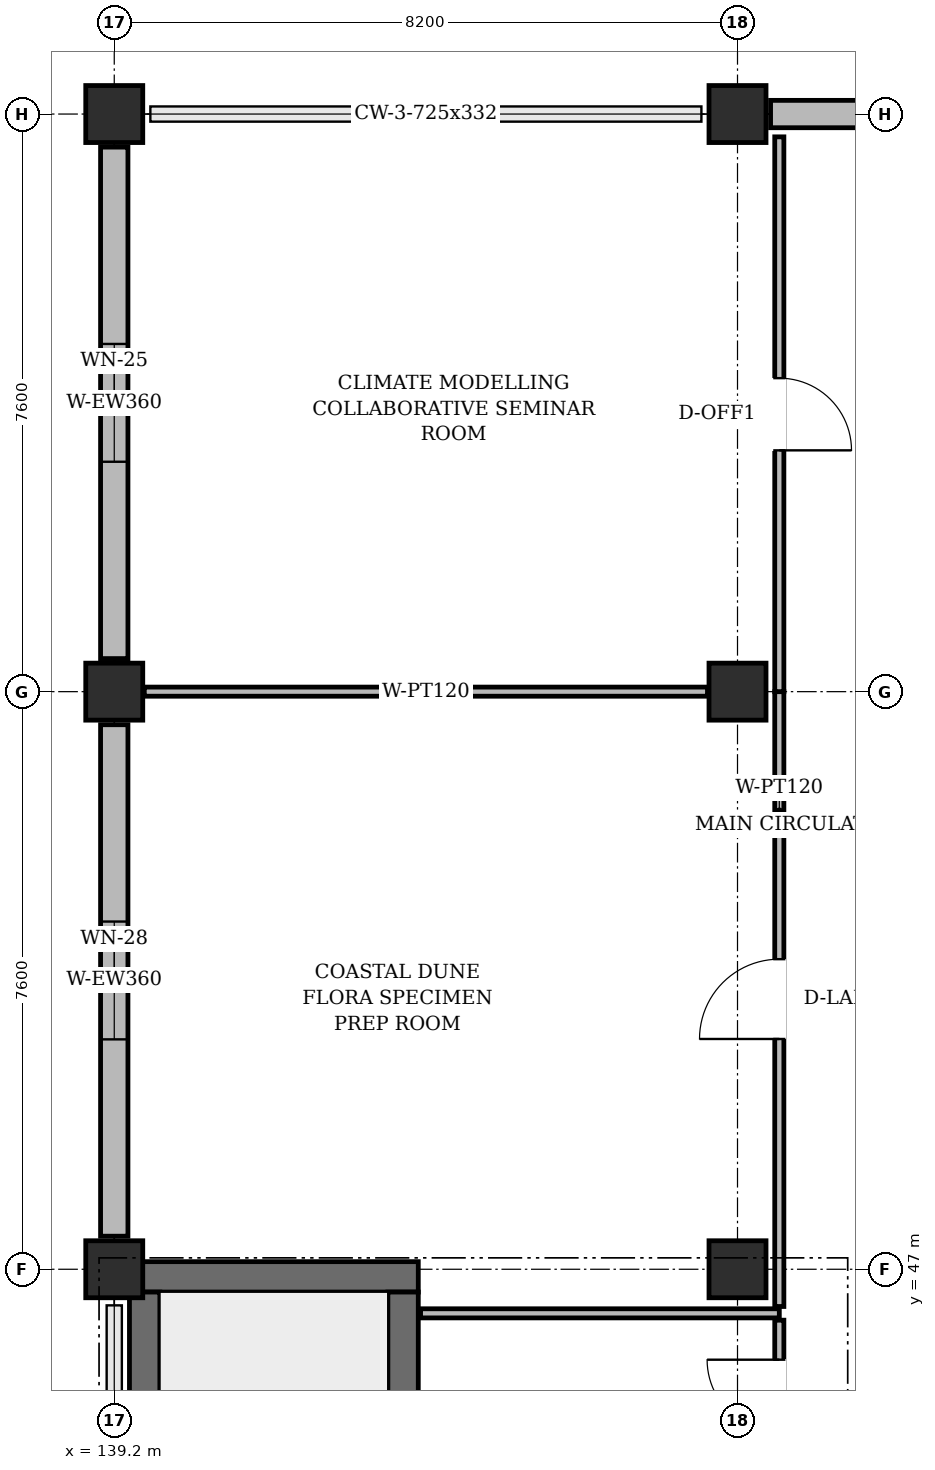
"""IFC4 building model, lengths in metres.
Left out: names, types, materials, properties, quantities, classifications, styles, units other than length and angle.
Written with IfcOpenShell. Run it as: python <this file> out.ifc"""

import sys

from ifc_helpers import new_model, si_unit, direction, frame, frame_2d, origin, origin_2d, place, context, subcontext, project, spatial, rectangle, extrude, element, fill, save


model = new_model("IFC4")
c1 = context("Model", 3, precision=1e-05, world=origin(), true_north=direction((0.0, 1.0)))
c2 = subcontext(c1, "Body", "Model", "MODEL_VIEW")
j1 = project(units=[si_unit("LENGTHUNIT", "METRE"), si_unit("PLANEANGLEUNIT", "RADIAN")], contexts=[c1])
p1 = place(None, origin())
s1 = spatial("IfcSite", under=j1, at=p1, CompositionType="ELEMENT")
p2 = place(p1, origin())
s2 = spatial("IfcBuilding", under=s1, at=p2, CompositionType="ELEMENT")
p3 = place(p2, frame((0.0, 0.0, 57.6)))
s3 = spatial("IfcBuildingStorey", under=s2, at=p3, CompositionType="ELEMENT", Elevation=57.6)
for number, where, z_axis, x_axis in (
    (1, (139.2, 47.0, 0.0), (0.0, 0.0, 1.0), (1.0, 0.0, 0.0)),
    (2, (139.2, 54.6, 0.0), (0.0, 0.0, 1.0), (1.0, 0.0, 0.0)),
    (3, (139.2, 62.2, 0.0), (0.0, 0.0, 1.0), (1.0, 0.0, 0.0)),
    (4, (147.4, 47.0, 0.0), (0.0, 0.0, 1.0), (1.0, 0.0, 0.0)),
    (5, (147.4, 54.6, 0.0), (0.0, 0.0, 1.0), (1.0, 0.0, 0.0)),
    (6, (147.4, 62.2, 0.0), (0.0, 0.0, 1.0), (1.0, 0.0, 0.0)),
):
    element("IfcColumn", number, at=place(p3, frame(where, z_axis=z_axis, x_axis=x_axis)), inside=s3, PredefinedType="COLUMN", context=c2, shape_type="SweptSolid", body=[
        extrude(rectangle(XDim=0.75, YDim=0.75, at=origin_2d()), origin(), (0.0, 0.0, 1.0), 3.92),
    ])
p4 = place(p3, frame((155.165, 62.2, 0.0), z_axis=(0.0, 0.0, 1.0), x_axis=(-1.0, 0.0, 0.0)))
e7 = element("IfcWall", 7, at=p4, inside=s3, PredefinedType="SOLIDWALL", context=c2, shape_type="SweptSolid", body=[
    extrude(rectangle(XDim=7.33, YDim=0.36, at=frame_2d((3.665, 0.0))), origin(), (0.0, 0.0, 1.0), 3.305),
])
p5 = place(p4, frame((2.34, 0.0, 0.95)))
e8 = element("IfcOpeningElement", 8, at=p5, cuts=e7, PredefinedType="OPENING", context=c2, shape_type="SweptSolid", body=[
    extrude(rectangle(XDim=2.65, YDim=1.75, at=frame_2d((1.325, 0.875))), frame((0.0, 0.192, 0.0), z_axis=(0.0, -1.0, 0.0), x_axis=(1.0, 0.0, 0.0)), (0.0, 0.0, 1.0), 0.384),
])
p6 = place(p3, frame((139.2, 61.765, 0.0), z_axis=(0.0, 0.0, 1.0), x_axis=(0.0, -1.0, 0.0)))
e9 = element("IfcWall", 9, at=p6, inside=s3, PredefinedType="SOLIDWALL", context=c2, shape_type="SweptSolid", body=[
    extrude(rectangle(XDim=6.73, YDim=0.36, at=frame_2d((3.365, 0.0))), origin(), (0.0, 0.0, 1.0), 3.305),
])
p7 = place(p6, frame((2.59, 0.0, 0.95)))
e10 = element("IfcOpeningElement", 10, at=p7, cuts=e9, PredefinedType="OPENING", context=c2, shape_type="SweptSolid", body=[
    extrude(rectangle(XDim=1.55, YDim=1.25, at=frame_2d((0.775, 0.625))), frame((0.0, 0.192, 0.0), z_axis=(0.0, -1.0, 0.0), x_axis=(1.0, 0.0, 0.0)), (0.0, 0.0, 1.0), 0.384),
])
p8 = place(p3, frame((139.2, 54.165, 0.0), z_axis=(0.0, 0.0, 1.0), x_axis=(0.0, -1.0, 0.0)))
e11 = element("IfcWall", 11, at=p8, inside=s3, PredefinedType="SOLIDWALL", context=c2, shape_type="SweptSolid", body=[
    extrude(rectangle(XDim=6.73, YDim=0.36, at=frame_2d((3.365, 0.0))), origin(), (0.0, 0.0, 1.0), 3.305),
])
p9 = place(p8, frame((2.59, 0.0, 0.95)))
e12 = element("IfcOpeningElement", 12, at=p9, cuts=e11, PredefinedType="OPENING", context=c2, shape_type="SweptSolid", body=[
    extrude(rectangle(XDim=1.55, YDim=2.05, at=frame_2d((0.775, 1.025))), frame((0.0, 0.192, 0.0), z_axis=(0.0, -1.0, 0.0), x_axis=(1.0, 0.0, 0.0)), (0.0, 0.0, 1.0), 0.384),
])
p10 = place(p3, frame((139.4, 46.9, 0.0), z_axis=(0.0, 0.0, 1.0), x_axis=(1.0, 0.0, 0.0)))
e13 = element("IfcWall", 13, at=p10, inside=s3, PredefinedType="SHEAR", context=c2, shape_type="SweptSolid", body=[
    extrude(rectangle(XDim=3.8, YDim=0.4, at=frame_2d((1.9, 0.0))), origin(), (0.0, 0.0, 1.0), 3.92),
])
for number, where, z_axis, x_axis in (
    (14, (139.6, 39.7, 0.0), (0.0, 0.0, 1.0), (0.0, 1.0, 0.0)),
    (15, (143.0, 39.7, 0.0), (0.0, 0.0, 1.0), (0.0, 1.0, 0.0)),
):
    element("IfcWall", number, at=place(p3, frame(where, z_axis=z_axis, x_axis=x_axis)), inside=s3, PredefinedType="SHEAR", context=c2, shape_type="SweptSolid", body=[
        extrude(rectangle(XDim=7.0, YDim=0.4, at=frame_2d((3.5, 0.0))), origin(), (0.0, 0.0, 1.0), 3.92),
    ])
p11 = place(p3, frame((143.23, 46.42, 0.0), z_axis=(0.0, 0.0, 1.0), x_axis=(1.0, 0.0, 0.0)))
e16 = element("IfcWall", 16, at=p11, inside=s3, PredefinedType="PARTITIONING", context=c2, shape_type="SweptSolid", body=[
    extrude(rectangle(XDim=4.72, YDim=0.12, at=frame_2d((2.36, 0.0))), origin(), (0.0, 0.0, 1.0), 3.805),
])
p12 = place(p3, frame((147.95, 46.33, 0.0), z_axis=(0.0, 0.0, 1.0), x_axis=(0.0, -1.0, 0.0)))
e17 = element("IfcWall", 17, at=p12, inside=s3, PredefinedType="PARTITIONING", context=c2, shape_type="SweptSolid", body=[
    extrude(rectangle(XDim=1.99, YDim=0.12, at=frame_2d((0.995, 0.0))), origin(), (0.0, 0.0, 1.0), 3.805),
])
p13 = place(p12, frame((0.52, 0.0, 0.0)))
e18 = element("IfcOpeningElement", 18, at=p13, cuts=e17, PredefinedType="OPENING", context=c2, shape_type="SweptSolid", body=[
    extrude(rectangle(XDim=0.95, YDim=2.15, at=frame_2d((0.475, 1.075))), frame((0.0, 0.072, 0.0), z_axis=(0.0, -1.0, 0.0), x_axis=(1.0, 0.0, 0.0)), (0.0, 0.0, 1.0), 0.144),
])
p14 = place(p3, frame((147.95, 46.51, 0.0), z_axis=(0.0, 0.0, 1.0), x_axis=(0.0, 1.0, 0.0)))
e19 = element("IfcWall", 19, at=p14, inside=s3, PredefinedType="PARTITIONING", context=c2, shape_type="SweptSolid", body=[
    extrude(rectangle(XDim=8.09, YDim=0.12, at=frame_2d((4.045, 0.0))), origin(), (0.0, 0.0, 1.0), 3.805),
])
p15 = place(p14, frame((3.52, 0.0, 0.0)))
e20 = element("IfcOpeningElement", 20, at=p15, cuts=e19, PredefinedType="OPENING", context=c2, shape_type="SweptSolid", body=[
    extrude(rectangle(XDim=1.05, YDim=2.2, at=frame_2d((0.525, 1.1))), frame((0.0, 0.072, 0.0), z_axis=(0.0, -1.0, 0.0), x_axis=(1.0, 0.0, 0.0)), (0.0, 0.0, 1.0), 0.144),
])
p16 = place(p3, frame((147.95, 54.6, 0.0), z_axis=(0.0, 0.0, 1.0), x_axis=(0.0, 1.0, 0.0)))
e21 = element("IfcWall", 21, at=p16, inside=s3, PredefinedType="PARTITIONING", context=c2, shape_type="SweptSolid", body=[
    extrude(rectangle(XDim=7.3, YDim=0.12, at=frame_2d((3.65, 0.0))), origin(), (0.0, 0.0, 1.0), 3.805),
])
p17 = place(p16, frame((3.175, 0.0, 0.0)))
e22 = element("IfcOpeningElement", 22, at=p17, cuts=e21, PredefinedType="OPENING", context=c2, shape_type="SweptSolid", body=[
    extrude(rectangle(XDim=0.95, YDim=2.2, at=frame_2d((0.475, 1.1))), frame((0.0, 0.072, 0.0), z_axis=(0.0, -1.0, 0.0), x_axis=(1.0, 0.0, 0.0)), (0.0, 0.0, 1.0), 0.144),
])
p18 = place(p3, frame((139.595, 54.6, 0.0), z_axis=(0.0, 0.0, 1.0), x_axis=(1.0, 0.0, 0.0)))
e23 = element("IfcWall", 23, at=p18, inside=s3, PredefinedType="PARTITIONING", context=c2, shape_type="SweptSolid", body=[
    extrude(rectangle(XDim=7.41, YDim=0.12, at=frame_2d((3.705, 0.0))), origin(), (0.0, 0.0, 1.0), 3.255),
])
p19 = place(p7, origin())
e24 = element("IfcWindow", 24, at=p19, inside=s3, PartitioningType="DOUBLE_PANEL_VERTICAL", PredefinedType="WINDOW", context=c2, shape_type="SweptSolid", body=[
    extrude(rectangle(XDim=1.55, YDim=1.25, at=frame_2d((0.775, 0.625))), frame((0.0, 0.03, 0.0), z_axis=(0.0, -1.0, 0.0), x_axis=(1.0, 0.0, 0.0)), (0.0, 0.0, 1.0), 0.06),
])
fill(e10, e24)
p20 = place(p9, origin())
e25 = element("IfcWindow", 25, at=p20, inside=s3, PartitioningType="DOUBLE_PANEL_VERTICAL", PredefinedType="WINDOW", context=c2, shape_type="SweptSolid", body=[
    extrude(rectangle(XDim=1.55, YDim=2.05, at=frame_2d((0.775, 1.025))), frame((0.0, 0.03, 0.0), z_axis=(0.0, -1.0, 0.0), x_axis=(1.0, 0.0, 0.0)), (0.0, 0.0, 1.0), 0.06),
])
fill(e12, e25)
p21 = place(p13, frame((0.95, 0.0, 0.0), z_axis=(0.0, 0.0, 1.0), x_axis=(-1.0, 0.0, 0.0)))
e26 = element("IfcDoor", 26, at=p21, inside=s3, OperationType="SINGLE_SWING_RIGHT", PredefinedType="DOOR", context=c2, shape_type="SweptSolid", body=[
    extrude(rectangle(XDim=0.95, YDim=2.15, at=frame_2d((0.475, 1.075))), frame((0.0, 0.025, 0.0), z_axis=(0.0, -1.0, 0.0), x_axis=(1.0, 0.0, 0.0)), (0.0, 0.0, 1.0), 0.05),
])
fill(e18, e26)
p22 = place(p15, origin())
e27 = element("IfcDoor", 27, at=p22, inside=s3, OperationType="SINGLE_SWING_LEFT", PredefinedType="DOOR", context=c2, shape_type="SweptSolid", body=[
    extrude(rectangle(XDim=1.05, YDim=2.2, at=frame_2d((0.525, 1.1))), frame((0.0, 0.025, 0.0), z_axis=(0.0, -1.0, 0.0), x_axis=(1.0, 0.0, 0.0)), (0.0, 0.0, 1.0), 0.05),
])
fill(e20, e27)
p23 = place(p17, frame((0.95, 0.0, 0.0), z_axis=(0.0, 0.0, 1.0), x_axis=(-1.0, 0.0, 0.0)))
e28 = element("IfcDoor", 28, at=p23, inside=s3, OperationType="SINGLE_SWING_RIGHT", PredefinedType="DOOR", context=c2, shape_type="SweptSolid", body=[
    extrude(rectangle(XDim=0.95, YDim=2.2, at=frame_2d((0.475, 1.1))), frame((0.0, 0.025, 0.0), z_axis=(0.0, -1.0, 0.0), x_axis=(1.0, 0.0, 0.0)), (0.0, 0.0, 1.0), 0.05),
])
fill(e22, e28)
save(model, sys.argv[1])
